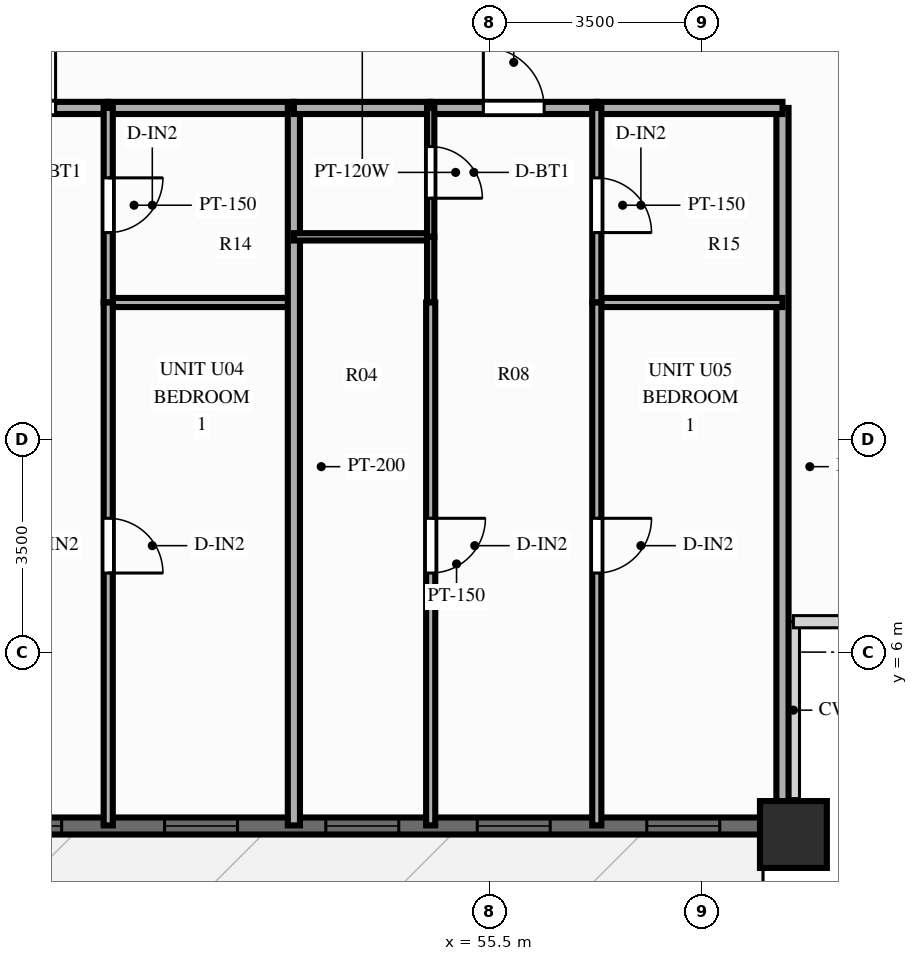
"""IFC4 building model, lengths in metres.
Left out: names, types, materials, properties, quantities, classifications, styles, units other than length and angle.
Written with IfcOpenShell. Run it as: python <this file> out.ifc"""

import sys

from ifc_helpers import new_model, si_unit, direction, frame, frame_2d, origin, origin_2d, place, context, subcontext, project, spatial, rectangle, extrude, source, transform, mapped, element, fill, save


model = new_model("IFC4")
c1 = context("Model", 3, precision=1e-05, world=origin(), true_north=direction((0.0, 1.0)))
c2 = subcontext(c1, "Body", "Model", "MODEL_VIEW")
j1 = project(units=[si_unit("LENGTHUNIT", "METRE"), si_unit("PLANEANGLEUNIT", "RADIAN")], contexts=[c1])
p1 = place(None, origin())
s1 = spatial("IfcSite", under=j1, at=p1, CompositionType="ELEMENT")
p2 = place(p1, origin())
s2 = spatial("IfcBuilding", under=s1, at=p2, CompositionType="ELEMENT")
p3 = place(p2, frame((0.0, 0.0, 61.4)))
s3 = spatial("IfcBuildingStorey", under=s2, at=p3, CompositionType="ELEMENT", Elevation=61.4)
m1 = source(origin(), c2, "Body", "SweptSolid", [
    extrude(rectangle(XDim=1.1, YDim=1.1, at=origin_2d()), origin(), (0.0, 0.0, 1.0), 3.0),
])
p4 = place(p3, frame((60.5, 3.0, 0.0), z_axis=(0.0, 0.0, 1.0), x_axis=(1.0, 0.0, 0.0)))
e1 = element("IfcColumn", 1, at=p4, inside=s3, PredefinedType="COLUMN", context=c2, shape_type="MappedRepresentation", body=[
    mapped(m1, transform((0.0, 0.0, 0.0), scale=1.0)),
])
p5 = place(p3, frame((15.5, 3.14, 0.0), z_axis=(0.0, 0.0, 1.0), x_axis=(1.0, 0.0, 0.0)))
e2 = element("IfcWall", 2, at=p5, inside=s3, PredefinedType="SOLIDWALL", context=c2, shape_type="SweptSolid", body=[
    extrude(rectangle(XDim=45.0, YDim=0.28, at=frame_2d((22.5, 0.0))), origin(), (0.0, 0.0, 1.0), 2.28),
])
p6 = place(p5, frame((1.426, 0.0, 0.25)))
e3 = element("IfcOpeningElement", 3, at=p6, cuts=e2, PredefinedType="OPENING", context=c2, shape_type="SweptSolid", body=[
    extrude(rectangle(XDim=1.2, YDim=1.5, at=frame_2d((0.6, 0.75))), frame((0.0, 0.152, 0.0), z_axis=(0.0, -1.0, 0.0), x_axis=(1.0, 0.0, 0.0)), (0.0, 0.0, 1.0), 0.304),
])
p7 = place(p5, frame((7.278, 0.0, 0.0), z_axis=(0.0, 0.0, 1.0), x_axis=(-1.0, 0.0, 0.0)))
e4 = element("IfcOpeningElement", 4, at=p7, cuts=e2, PredefinedType="OPENING", context=c2, shape_type="SweptSolid", body=[
    extrude(rectangle(XDim=1.1, YDim=2.15, at=frame_2d((0.55, 1.075))), frame((0.0, 0.152, 0.0), z_axis=(0.0, -1.0, 0.0), x_axis=(1.0, 0.0, 0.0)), (0.0, 0.0, 1.0), 0.304),
])
p8 = place(p5, frame((11.083, 0.0, 0.25)))
e5 = element("IfcOpeningElement", 5, at=p8, cuts=e2, PredefinedType="OPENING", context=c2, shape_type="SweptSolid", body=[
    extrude(rectangle(XDim=1.2, YDim=1.5, at=frame_2d((0.6, 0.75))), frame((0.0, 0.152, 0.0), z_axis=(0.0, -1.0, 0.0), x_axis=(1.0, 0.0, 0.0)), (0.0, 0.0, 1.0), 0.304),
])
p9 = place(p5, frame((13.991, 0.0, 0.25)))
e6 = element("IfcOpeningElement", 6, at=p9, cuts=e2, PredefinedType="OPENING", context=c2, shape_type="SweptSolid", body=[
    extrude(rectangle(XDim=1.2, YDim=1.5, at=frame_2d((0.6, 0.75))), frame((0.0, 0.152, 0.0), z_axis=(0.0, -1.0, 0.0), x_axis=(1.0, 0.0, 0.0)), (0.0, 0.0, 1.0), 0.304),
])
p10 = place(p5, frame((16.858, 0.0, 0.25)))
e7 = element("IfcOpeningElement", 7, at=p10, cuts=e2, PredefinedType="OPENING", context=c2, shape_type="SweptSolid", body=[
    extrude(rectangle(XDim=0.95, YDim=1.5, at=frame_2d((0.475, 0.75))), frame((0.0, 0.152, 0.0), z_axis=(0.0, -1.0, 0.0), x_axis=(1.0, 0.0, 0.0)), (0.0, 0.0, 1.0), 0.304),
])
p11 = place(p5, frame((19.119, 0.0, 0.25)))
e8 = element("IfcOpeningElement", 8, at=p11, cuts=e2, PredefinedType="OPENING", context=c2, shape_type="SweptSolid", body=[
    extrude(rectangle(XDim=1.2, YDim=1.5, at=frame_2d((0.6, 0.75))), frame((0.0, 0.152, 0.0), z_axis=(0.0, -1.0, 0.0), x_axis=(1.0, 0.0, 0.0)), (0.0, 0.0, 1.0), 0.304),
])
p12 = place(p5, frame((21.661, 0.0, 0.25)))
e9 = element("IfcOpeningElement", 9, at=p12, cuts=e2, PredefinedType="OPENING", context=c2, shape_type="SweptSolid", body=[
    extrude(rectangle(XDim=1.2, YDim=1.5, at=frame_2d((0.6, 0.75))), frame((0.0, 0.152, 0.0), z_axis=(0.0, -1.0, 0.0), x_axis=(1.0, 0.0, 0.0)), (0.0, 0.0, 1.0), 0.304),
])
p13 = place(p5, frame((24.013, 0.0, 0.25)))
e10 = element("IfcOpeningElement", 10, at=p13, cuts=e2, PredefinedType="OPENING", context=c2, shape_type="SweptSolid", body=[
    extrude(rectangle(XDim=1.2, YDim=1.5, at=frame_2d((0.6, 0.75))), frame((0.0, 0.152, 0.0), z_axis=(0.0, -1.0, 0.0), x_axis=(1.0, 0.0, 0.0)), (0.0, 0.0, 1.0), 0.304),
])
p14 = place(p5, frame((26.638, 0.0, 0.25)))
e11 = element("IfcOpeningElement", 11, at=p14, cuts=e2, PredefinedType="OPENING", context=c2, shape_type="SweptSolid", body=[
    extrude(rectangle(XDim=1.2, YDim=1.5, at=frame_2d((0.6, 0.75))), frame((0.0, 0.152, 0.0), z_axis=(0.0, -1.0, 0.0), x_axis=(1.0, 0.0, 0.0)), (0.0, 0.0, 1.0), 0.304),
])
p15 = place(p5, frame((29.72, 0.0, 0.25)))
e12 = element("IfcOpeningElement", 12, at=p15, cuts=e2, PredefinedType="OPENING", context=c2, shape_type="SweptSolid", body=[
    extrude(rectangle(XDim=0.95, YDim=1.5, at=frame_2d((0.475, 0.75))), frame((0.0, 0.152, 0.0), z_axis=(0.0, -1.0, 0.0), x_axis=(1.0, 0.0, 0.0)), (0.0, 0.0, 1.0), 0.304),
])
p16 = place(p5, frame((31.765, 0.0, 0.25)))
e13 = element("IfcOpeningElement", 13, at=p16, cuts=e2, PredefinedType="OPENING", context=c2, shape_type="SweptSolid", body=[
    extrude(rectangle(XDim=1.2, YDim=1.5, at=frame_2d((0.6, 0.75))), frame((0.0, 0.152, 0.0), z_axis=(0.0, -1.0, 0.0), x_axis=(1.0, 0.0, 0.0)), (0.0, 0.0, 1.0), 0.304),
])
p17 = place(p5, frame((34.658, 0.0, 0.25)))
e14 = element("IfcOpeningElement", 14, at=p17, cuts=e2, PredefinedType="OPENING", context=c2, shape_type="SweptSolid", body=[
    extrude(rectangle(XDim=1.2, YDim=1.5, at=frame_2d((0.6, 0.75))), frame((0.0, 0.152, 0.0), z_axis=(0.0, -1.0, 0.0), x_axis=(1.0, 0.0, 0.0)), (0.0, 0.0, 1.0), 0.304),
])
p18 = place(p5, frame((37.31, 0.0, 0.25)))
e15 = element("IfcOpeningElement", 15, at=p18, cuts=e2, PredefinedType="OPENING", context=c2, shape_type="SweptSolid", body=[
    extrude(rectangle(XDim=1.2, YDim=1.5, at=frame_2d((0.6, 0.75))), frame((0.0, 0.152, 0.0), z_axis=(0.0, -1.0, 0.0), x_axis=(1.0, 0.0, 0.0)), (0.0, 0.0, 1.0), 0.304),
])
p19 = place(p5, frame((39.801, 0.0, 0.25)))
e16 = element("IfcOpeningElement", 16, at=p19, cuts=e2, PredefinedType="OPENING", context=c2, shape_type="SweptSolid", body=[
    extrude(rectangle(XDim=1.2, YDim=1.5, at=frame_2d((0.6, 0.75))), frame((0.0, 0.152, 0.0), z_axis=(0.0, -1.0, 0.0), x_axis=(1.0, 0.0, 0.0)), (0.0, 0.0, 1.0), 0.304),
])
p20 = place(p5, frame((42.588, 0.0, 0.25)))
e17 = element("IfcOpeningElement", 17, at=p20, cuts=e2, PredefinedType="OPENING", context=c2, shape_type="SweptSolid", body=[
    extrude(rectangle(XDim=1.2, YDim=1.5, at=frame_2d((0.6, 0.75))), frame((0.0, 0.152, 0.0), z_axis=(0.0, -1.0, 0.0), x_axis=(1.0, 0.0, 0.0)), (0.0, 0.0, 1.0), 0.304),
])
p21 = place(p3, frame((60.32, 14.95, 0.0), z_axis=(0.0, 0.0, 1.0), x_axis=(0.0, -1.0, 0.0)))
e18 = element("IfcWall", 18, at=p21, inside=s3, PredefinedType="PARTITIONING", context=c2, shape_type="SweptSolid", body=[
    extrude(rectangle(XDim=11.8, YDim=0.2, at=frame_2d((5.9, 0.0))), origin(), (0.0, 0.0, 1.0), 2.79),
])
p22 = place(p3, frame((46.5, 14.95, 0.0), z_axis=(0.0, 0.0, 1.0), x_axis=(1.0, 0.0, 0.0)))
e19 = element("IfcWall", 19, at=p22, inside=s3, PredefinedType="PARTITIONING", context=c2, shape_type="SweptSolid", body=[
    extrude(rectangle(XDim=2.732, YDim=0.2, at=frame_2d((1.366, 0.0))), origin(), (0.0, 0.0, 1.0), 2.79),
])
p23 = place(p22, frame((0.866, 0.0, 0.0)))
e20 = element("IfcOpeningElement", 20, at=p23, cuts=e19, PredefinedType="OPENING", context=c2, shape_type="SweptSolid", body=[
    extrude(rectangle(XDim=1.0, YDim=2.15, at=frame_2d((0.5, 1.075))), frame((0.0, 0.112, 0.0), z_axis=(0.0, -1.0, 0.0), x_axis=(1.0, 0.0, 0.0)), (0.0, 0.0, 1.0), 0.224),
])
p24 = place(p3, frame((49.231, 14.95, 0.0), z_axis=(0.0, 0.0, 1.0), x_axis=(1.0, 0.0, 0.0)))
e21 = element("IfcWall", 21, at=p24, inside=s3, PredefinedType="PARTITIONING", context=c2, shape_type="SweptSolid", body=[
    extrude(rectangle(XDim=3.053, YDim=0.2, at=frame_2d((1.527, 0.0))), origin(), (0.0, 0.0, 1.0), 2.79),
])
p25 = place(p3, frame((49.231, 11.75, 0.0), z_axis=(0.0, 0.0, 1.0), x_axis=(1.0, 0.0, 0.0)))
e22 = element("IfcWall", 22, at=p25, inside=s3, PredefinedType="PARTITIONING", context=c2, shape_type="SweptSolid", body=[
    extrude(rectangle(XDim=3.053, YDim=0.15, at=frame_2d((1.527, 0.0))), origin(), (0.0, 0.0, 1.0), 2.79),
])
p26 = place(p3, frame((49.231, 14.95, 0.0), z_axis=(0.0, 0.0, 1.0), x_axis=(0.0, -1.0, 0.0)))
e23 = element("IfcWall", 23, at=p26, inside=s3, PredefinedType="PARTITIONING", context=c2, shape_type="SweptSolid", body=[
    extrude(rectangle(XDim=3.2, YDim=0.15, at=frame_2d((1.6, 0.0))), origin(), (0.0, 0.0, 1.0), 2.79),
])
p27 = place(p26, frame((1.15, 0.0, 0.0)))
e24 = element("IfcOpeningElement", 24, at=p27, cuts=e23, PredefinedType="OPENING", context=c2, shape_type="SweptSolid", body=[
    extrude(rectangle(XDim=0.9, YDim=2.1, at=frame_2d((0.45, 1.05))), frame((0.0, 0.087, 0.0), z_axis=(0.0, -1.0, 0.0), x_axis=(1.0, 0.0, 0.0)), (0.0, 0.0, 1.0), 0.174),
])
p28 = place(p3, frame((49.231, 11.75, 0.0), z_axis=(0.0, 0.0, 1.0), x_axis=(0.0, -1.0, 0.0)))
e25 = element("IfcWall", 25, at=p28, inside=s3, PredefinedType="PARTITIONING", context=c2, shape_type="SweptSolid", body=[
    extrude(rectangle(XDim=8.6, YDim=0.15, at=frame_2d((4.3, 0.0))), origin(), (0.0, 0.0, 1.0), 2.79),
])
p29 = place(p28, frame((3.549, 0.0, 0.0)))
e26 = element("IfcOpeningElement", 26, at=p29, cuts=e25, PredefinedType="OPENING", context=c2, shape_type="SweptSolid", body=[
    extrude(rectangle(XDim=0.9, YDim=2.1, at=frame_2d((0.45, 1.05))), frame((0.0, 0.087, 0.0), z_axis=(0.0, -1.0, 0.0), x_axis=(1.0, 0.0, 0.0)), (0.0, 0.0, 1.0), 0.174),
])
p30 = place(p3, frame((52.285, 14.95, 0.0), z_axis=(0.0, 0.0, 1.0), x_axis=(0.0, -1.0, 0.0)))
e27 = element("IfcWall", 27, at=p30, inside=s3, PredefinedType="PARTITIONING", context=c2, shape_type="SweptSolid", body=[
    extrude(rectangle(XDim=11.8, YDim=0.2, at=frame_2d((5.9, 0.0))), origin(), (0.0, 0.0, 1.0), 2.79),
])
p31 = place(p3, frame((52.285, 14.95, 0.0), z_axis=(0.0, 0.0, 1.0), x_axis=(1.0, 0.0, 0.0)))
e28 = element("IfcWall", 28, at=p31, inside=s3, PredefinedType="PARTITIONING", context=c2, shape_type="SweptSolid", body=[
    extrude(rectangle(XDim=2.25, YDim=0.2, at=frame_2d((1.125, 0.0))), origin(), (0.0, 0.0, 1.0), 2.79),
])
p32 = place(p3, frame((54.535, 14.95, 0.0), z_axis=(0.0, 0.0, 1.0), x_axis=(1.0, 0.0, 0.0)))
e29 = element("IfcWall", 29, at=p32, inside=s3, PredefinedType="PARTITIONING", context=c2, shape_type="SweptSolid", body=[
    extrude(rectangle(XDim=2.732, YDim=0.2, at=frame_2d((1.366, 0.0))), origin(), (0.0, 0.0, 1.0), 2.79),
])
p33 = place(p32, frame((0.866, 0.0, 0.0)))
e30 = element("IfcOpeningElement", 30, at=p33, cuts=e29, PredefinedType="OPENING", context=c2, shape_type="SweptSolid", body=[
    extrude(rectangle(XDim=1.0, YDim=2.15, at=frame_2d((0.5, 1.075))), frame((0.0, 0.112, 0.0), z_axis=(0.0, -1.0, 0.0), x_axis=(1.0, 0.0, 0.0)), (0.0, 0.0, 1.0), 0.224),
])
p34 = place(p3, frame((57.267, 14.95, 0.0), z_axis=(0.0, 0.0, 1.0), x_axis=(1.0, 0.0, 0.0)))
e31 = element("IfcWall", 31, at=p34, inside=s3, PredefinedType="PARTITIONING", context=c2, shape_type="SweptSolid", body=[
    extrude(rectangle(XDim=3.053, YDim=0.2, at=frame_2d((1.527, 0.0))), origin(), (0.0, 0.0, 1.0), 2.79),
])
p35 = place(p3, frame((52.285, 12.83, 0.0), z_axis=(0.0, 0.0, 1.0), x_axis=(1.0, 0.0, 0.0)))
e32 = element("IfcWall", 32, at=p35, inside=s3, PredefinedType="PARTITIONING", context=c2, shape_type="SweptSolid", body=[
    extrude(rectangle(XDim=2.25, YDim=0.12, at=frame_2d((1.125, 0.0))), origin(), (0.0, 0.0, 1.0), 2.79),
])
p36 = place(p3, frame((57.267, 11.75, 0.0), z_axis=(0.0, 0.0, 1.0), x_axis=(1.0, 0.0, 0.0)))
e33 = element("IfcWall", 33, at=p36, inside=s3, PredefinedType="PARTITIONING", context=c2, shape_type="SweptSolid", body=[
    extrude(rectangle(XDim=3.053, YDim=0.15, at=frame_2d((1.527, 0.0))), origin(), (0.0, 0.0, 1.0), 2.79),
])
p37 = place(p3, frame((54.535, 14.95, 0.0), z_axis=(0.0, 0.0, 1.0), x_axis=(0.0, -1.0, 0.0)))
e34 = element("IfcWall", 34, at=p37, inside=s3, PredefinedType="PARTITIONING", context=c2, shape_type="SweptSolid", body=[
    extrude(rectangle(XDim=2.12, YDim=0.12, at=frame_2d((1.06, 0.0))), origin(), (0.0, 0.0, 1.0), 2.79),
])
p38 = place(p37, frame((0.635, 0.0, 0.0)))
e35 = element("IfcOpeningElement", 35, at=p38, cuts=e34, PredefinedType="OPENING", context=c2, shape_type="SweptSolid", body=[
    extrude(rectangle(XDim=0.85, YDim=2.05, at=frame_2d((0.425, 1.025))), frame((0.0, 0.072, 0.0), z_axis=(0.0, -1.0, 0.0), x_axis=(1.0, 0.0, 0.0)), (0.0, 0.0, 1.0), 0.144),
])
p39 = place(p3, frame((54.535, 12.83, 0.0), z_axis=(0.0, 0.0, 1.0), x_axis=(0.0, -1.0, 0.0)))
e36 = element("IfcWall", 36, at=p39, inside=s3, PredefinedType="PARTITIONING", context=c2, shape_type="SweptSolid", body=[
    extrude(rectangle(XDim=1.08, YDim=0.12, at=frame_2d((0.54, 0.0))), origin(), (0.0, 0.0, 1.0), 2.79),
])
p40 = place(p3, frame((54.535, 11.75, 0.0), z_axis=(0.0, 0.0, 1.0), x_axis=(0.0, -1.0, 0.0)))
e37 = element("IfcWall", 37, at=p40, inside=s3, PredefinedType="PARTITIONING", context=c2, shape_type="SweptSolid", body=[
    extrude(rectangle(XDim=8.6, YDim=0.15, at=frame_2d((4.3, 0.0))), origin(), (0.0, 0.0, 1.0), 2.79),
])
p41 = place(p40, frame((3.549, 0.0, 0.0)))
e38 = element("IfcOpeningElement", 38, at=p41, cuts=e37, PredefinedType="OPENING", context=c2, shape_type="SweptSolid", body=[
    extrude(rectangle(XDim=0.9, YDim=2.1, at=frame_2d((0.45, 1.05))), frame((0.0, 0.087, 0.0), z_axis=(0.0, -1.0, 0.0), x_axis=(1.0, 0.0, 0.0)), (0.0, 0.0, 1.0), 0.174),
])
p42 = place(p3, frame((57.267, 14.95, 0.0), z_axis=(0.0, 0.0, 1.0), x_axis=(0.0, -1.0, 0.0)))
e39 = element("IfcWall", 39, at=p42, inside=s3, PredefinedType="PARTITIONING", context=c2, shape_type="SweptSolid", body=[
    extrude(rectangle(XDim=3.2, YDim=0.15, at=frame_2d((1.6, 0.0))), origin(), (0.0, 0.0, 1.0), 2.79),
])
p43 = place(p42, frame((1.15, 0.0, 0.0)))
e40 = element("IfcOpeningElement", 40, at=p43, cuts=e39, PredefinedType="OPENING", context=c2, shape_type="SweptSolid", body=[
    extrude(rectangle(XDim=0.9, YDim=2.1, at=frame_2d((0.45, 1.05))), frame((0.0, 0.087, 0.0), z_axis=(0.0, -1.0, 0.0), x_axis=(1.0, 0.0, 0.0)), (0.0, 0.0, 1.0), 0.174),
])
p44 = place(p3, frame((57.267, 11.75, 0.0), z_axis=(0.0, 0.0, 1.0), x_axis=(0.0, -1.0, 0.0)))
e41 = element("IfcWall", 41, at=p44, inside=s3, PredefinedType="PARTITIONING", context=c2, shape_type="SweptSolid", body=[
    extrude(rectangle(XDim=8.6, YDim=0.15, at=frame_2d((4.3, 0.0))), origin(), (0.0, 0.0, 1.0), 2.79),
])
p45 = place(p44, frame((3.549, 0.0, 0.0)))
e42 = element("IfcOpeningElement", 42, at=p45, cuts=e41, PredefinedType="OPENING", context=c2, shape_type="SweptSolid", body=[
    extrude(rectangle(XDim=0.9, YDim=2.1, at=frame_2d((0.45, 1.05))), frame((0.0, 0.087, 0.0), z_axis=(0.0, -1.0, 0.0), x_axis=(1.0, 0.0, 0.0)), (0.0, 0.0, 1.0), 0.174),
])
m2 = source(origin(), c2, "Body", "SweptSolid", [
    extrude(rectangle(XDim=1.2, YDim=1.5, at=frame_2d((0.6, 0.75))), frame((0.0, 0.03, 0.0), z_axis=(0.0, -1.0, 0.0), x_axis=(1.0, 0.0, 0.0)), (0.0, 0.0, 1.0), 0.06),
])
p46 = place(p16, origin())
e43 = element("IfcWindow", 43, at=p46, inside=s3, PartitioningType="SINGLE_PANEL", PredefinedType="WINDOW", context=c2, shape_type="MappedRepresentation", body=[
    mapped(m2, transform((0.0, 0.0, 0.0), scale=1.0)),
])
fill(e13, e43)
p47 = place(p17, origin())
e44 = element("IfcWindow", 44, at=p47, inside=s3, PartitioningType="SINGLE_PANEL", PredefinedType="WINDOW", context=c2, shape_type="MappedRepresentation", body=[
    mapped(m2, transform((0.0, 0.0, 0.0), scale=1.0)),
])
fill(e14, e44)
p48 = place(p18, origin())
e45 = element("IfcWindow", 45, at=p48, inside=s3, PartitioningType="SINGLE_PANEL", PredefinedType="WINDOW", context=c2, shape_type="MappedRepresentation", body=[
    mapped(m2, transform((0.0, 0.0, 0.0), scale=1.0)),
])
fill(e15, e45)
p49 = place(p19, origin())
e46 = element("IfcWindow", 46, at=p49, inside=s3, PartitioningType="SINGLE_PANEL", PredefinedType="WINDOW", context=c2, shape_type="MappedRepresentation", body=[
    mapped(m2, transform((0.0, 0.0, 0.0), scale=1.0)),
])
fill(e16, e46)
p50 = place(p20, origin())
e47 = element("IfcWindow", 47, at=p50, inside=s3, PartitioningType="SINGLE_PANEL", PredefinedType="WINDOW", context=c2, shape_type="MappedRepresentation", body=[
    mapped(m2, transform((0.0, 0.0, 0.0), scale=1.0)),
])
fill(e17, e47)
m3 = source(origin(), c2, "Body", "SweptSolid", [
    extrude(rectangle(XDim=1.0, YDim=2.15, at=frame_2d((0.5, 1.075))), frame((0.0, 0.025, 0.0), z_axis=(0.0, -1.0, 0.0), x_axis=(1.0, 0.0, 0.0)), (0.0, 0.0, 1.0), 0.05),
])
p51 = place(p23, origin())
e48 = element("IfcDoor", 48, at=p51, inside=s3, OperationType="SINGLE_SWING_RIGHT", PredefinedType="DOOR", context=c2, shape_type="MappedRepresentation", body=[
    mapped(m3, transform((0.0, 0.0, 0.0), scale=1.0)),
])
fill(e20, e48)
m4 = source(origin(), c2, "Body", "SweptSolid", [
    extrude(rectangle(XDim=0.9, YDim=2.1, at=frame_2d((0.45, 1.05))), frame((0.0, 0.025, 0.0), z_axis=(0.0, -1.0, 0.0), x_axis=(1.0, 0.0, 0.0)), (0.0, 0.0, 1.0), 0.05),
])
p52 = place(p27, origin())
e49 = element("IfcDoor", 49, at=p52, inside=s3, OperationType="SINGLE_SWING_LEFT", PredefinedType="DOOR", context=c2, shape_type="MappedRepresentation", body=[
    mapped(m4, transform((0.0, 0.0, 0.0), scale=1.0)),
])
fill(e24, e49)
p53 = place(p29, origin())
e50 = element("IfcDoor", 50, at=p53, inside=s3, OperationType="SINGLE_SWING_RIGHT", PredefinedType="DOOR", context=c2, shape_type="MappedRepresentation", body=[
    mapped(m4, transform((0.0, 0.0, 0.0), scale=1.0)),
])
fill(e26, e50)
p54 = place(p33, origin())
e51 = element("IfcDoor", 51, at=p54, inside=s3, OperationType="SINGLE_SWING_LEFT", PredefinedType="DOOR", context=c2, shape_type="MappedRepresentation", body=[
    mapped(m3, transform((0.0, 0.0, 0.0), scale=1.0)),
])
fill(e30, e51)
m5 = source(origin(), c2, "Body", "SweptSolid", [
    extrude(rectangle(XDim=0.85, YDim=2.05, at=frame_2d((0.425, 1.025))), frame((0.0, 0.025, 0.0), z_axis=(0.0, -1.0, 0.0), x_axis=(1.0, 0.0, 0.0)), (0.0, 0.0, 1.0), 0.05),
])
p55 = place(p38, origin())
e52 = element("IfcDoor", 52, at=p55, inside=s3, OperationType="SINGLE_SWING_RIGHT", PredefinedType="DOOR", context=c2, shape_type="MappedRepresentation", body=[
    mapped(m5, transform((0.0, 0.0, 0.0), scale=1.0)),
])
fill(e35, e52)
p56 = place(p41, origin())
e53 = element("IfcDoor", 53, at=p56, inside=s3, OperationType="SINGLE_SWING_LEFT", PredefinedType="DOOR", context=c2, shape_type="MappedRepresentation", body=[
    mapped(m4, transform((0.0, 0.0, 0.0), scale=1.0)),
])
fill(e38, e53)
p57 = place(p43, origin())
e54 = element("IfcDoor", 54, at=p57, inside=s3, OperationType="SINGLE_SWING_RIGHT", PredefinedType="DOOR", context=c2, shape_type="MappedRepresentation", body=[
    mapped(m4, transform((0.0, 0.0, 0.0), scale=1.0)),
])
fill(e40, e54)
p58 = place(p45, origin())
e55 = element("IfcDoor", 55, at=p58, inside=s3, OperationType="SINGLE_SWING_LEFT", PredefinedType="DOOR", context=c2, shape_type="MappedRepresentation", body=[
    mapped(m4, transform((0.0, 0.0, 0.0), scale=1.0)),
])
fill(e42, e55)
save(model, sys.argv[1])
